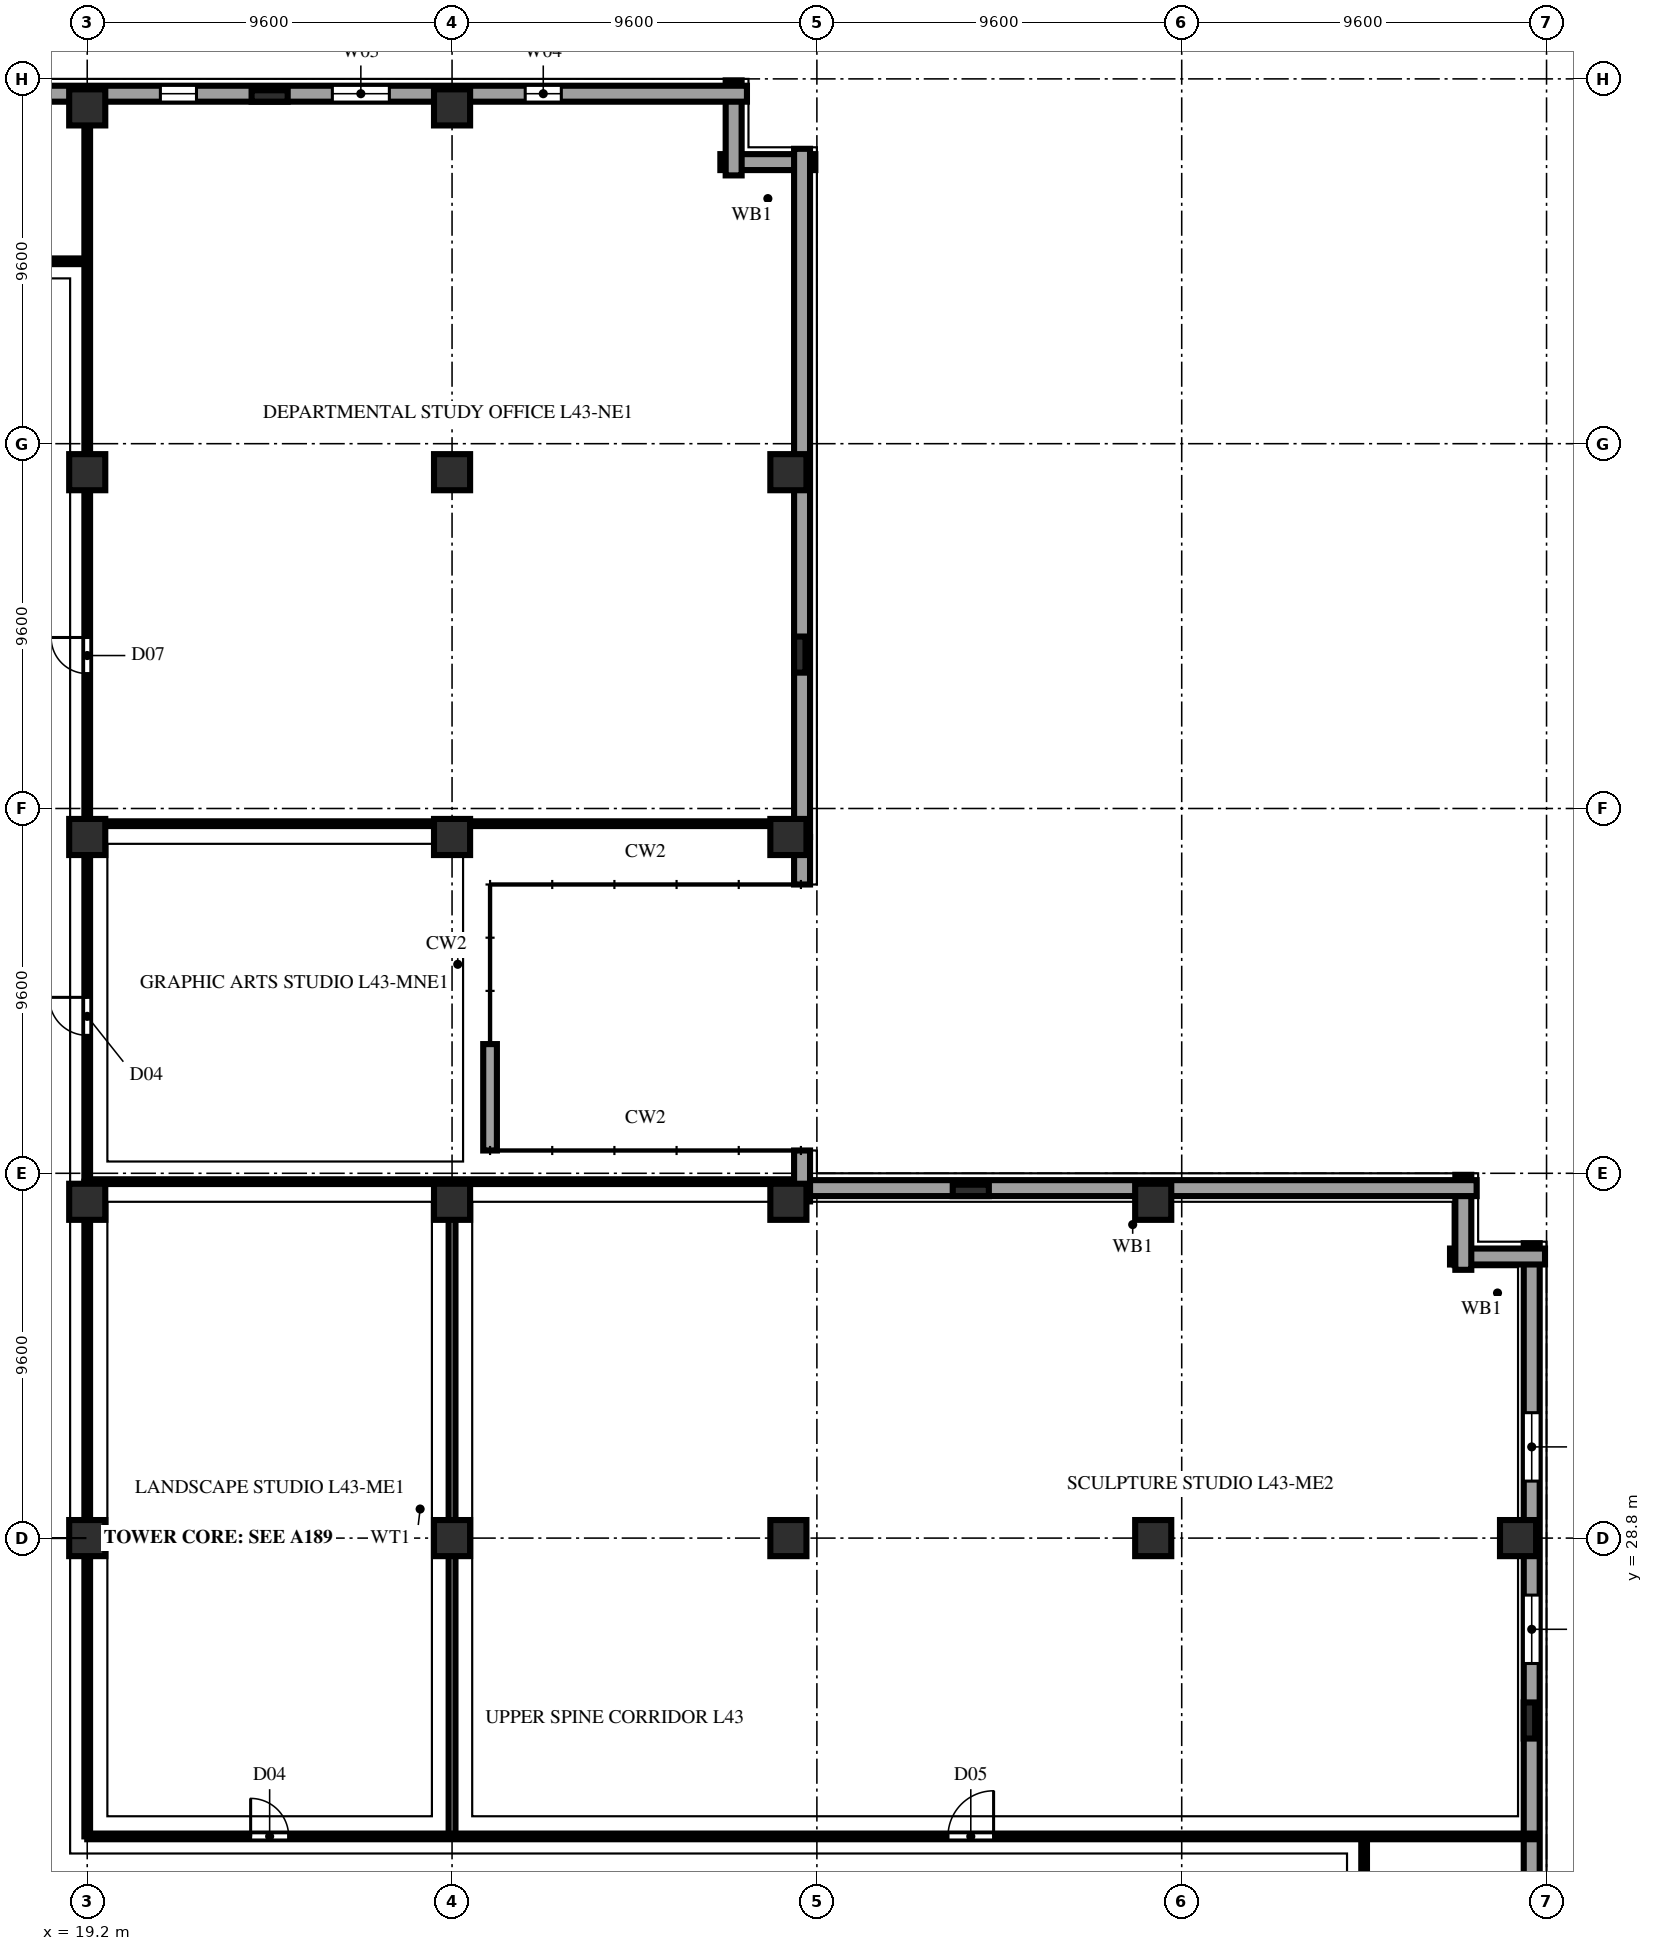
"""IFC4 building model, lengths in metres.
Left out: names, types, materials, properties, quantities, classifications, styles, units other than length and angle.
Written with IfcOpenShell. Run it as: python <this file> out.ifc"""

import sys

from ifc_helpers import new_model, si_unit, direction, frame, frame_2d, origin, origin_2d, place, context, subcontext, project, spatial, rectangle, extrude, element, fill, save


model = new_model("IFC4")
c1 = context("Model", 3, precision=1e-05, world=origin(), true_north=direction((0.0, 1.0)))
c2 = subcontext(c1, "Body", "Model", "MODEL_VIEW")
j1 = project(units=[si_unit("LENGTHUNIT", "METRE"), si_unit("PLANEANGLEUNIT", "RADIAN")], contexts=[c1])
p1 = place(None, origin())
s1 = spatial("IfcSite", under=j1, at=p1, CompositionType="ELEMENT")
p2 = place(p1, origin())
s2 = spatial("IfcBuilding", under=s1, at=p2, CompositionType="ELEMENT")
p3 = place(p2, frame((0.0, 0.0, 171.2)))
s3 = spatial("IfcBuildingStorey", under=s2, at=p3, CompositionType="ELEMENT", Elevation=171.2)
for number, where, z_axis, x_axis in (
    (1, (19.2, 28.8, 0.0), (0.0, 0.0, 1.0), (1.0, 0.0, 0.0)),
    (2, (19.2, 37.65, 0.0), (0.0, 0.0, 1.0), (1.0, 0.0, 0.0)),
    (3, (19.2, 47.25, 0.0), (0.0, 0.0, 1.0), (1.0, 0.0, 0.0)),
    (4, (19.2, 56.85, 0.0), (0.0, 0.0, 1.0), (1.0, 0.0, 0.0)),
    (5, (19.2, 66.45, 0.0), (0.0, 0.0, 1.0), (1.0, 0.0, 0.0)),
    (6, (28.8, 28.8, 0.0), (0.0, 0.0, 1.0), (1.0, 0.0, 0.0)),
    (7, (28.8, 37.65, 0.0), (0.0, 0.0, 1.0), (1.0, 0.0, 0.0)),
    (8, (28.8, 47.25, 0.0), (0.0, 0.0, 1.0), (1.0, 0.0, 0.0)),
    (9, (28.8, 56.85, 0.0), (0.0, 0.0, 1.0), (1.0, 0.0, 0.0)),
    (10, (28.8, 66.45, 0.0), (0.0, 0.0, 1.0), (1.0, 0.0, 0.0)),
    (11, (37.65, 28.8, 0.0), (0.0, 0.0, 1.0), (1.0, 0.0, 0.0)),
    (12, (37.65, 37.65, 0.0), (0.0, 0.0, 1.0), (1.0, 0.0, 0.0)),
    (13, (37.65, 47.25, 0.0), (0.0, 0.0, 1.0), (1.0, 0.0, 0.0)),
    (14, (37.65, 56.85, 0.0), (0.0, 0.0, 1.0), (1.0, 0.0, 0.0)),
    (15, (47.25, 28.8, 0.0), (0.0, 0.0, 1.0), (1.0, 0.0, 0.0)),
    (16, (47.25, 37.65, 0.0), (0.0, 0.0, 1.0), (1.0, 0.0, 0.0)),
    (17, (56.85, 28.8, 0.0), (0.0, 0.0, 1.0), (1.0, 0.0, 0.0)),
):
    element("IfcColumn", number, at=place(p3, frame(where, z_axis=z_axis, x_axis=x_axis)), inside=s3, PredefinedType="COLUMN", context=c2, shape_type="SweptSolid", body=[
        extrude(rectangle(XDim=0.95, YDim=0.95, at=origin_2d()), origin(), (0.0, 0.0, 1.0), 3.8),
    ])
for number, where, z_axis, x_axis in (
    (18, (57.15, 24.0, 0.0), (0.0, 0.0, 1.0), (0.0, 1.0, 0.0)),
    (19, (24.0, 66.75, 0.0), (0.0, 0.0, 1.0), (1.0, 0.0, 0.0)),
    (20, (37.95, 52.05, 0.0), (0.0, 0.0, 1.0), (0.0, 1.0, 0.0)),
    (21, (42.45, 37.95, 0.0), (0.0, 0.0, 1.0), (1.0, 0.0, 0.0)),
):
    element("IfcColumn", number, at=place(p3, frame(where, z_axis=z_axis, x_axis=x_axis)), inside=s3, PredefinedType="PILASTER", context=c2, shape_type="SweptSolid", body=[
        extrude(rectangle(XDim=0.95, YDim=0.3, at=origin_2d()), origin(), (0.0, 0.0, 1.0), 3.8),
    ])
p4 = place(p3, frame((57.21, 1.84, 0.0), z_axis=(0.0, 0.0, 1.0), x_axis=(0.0, 1.0, 0.0)))
e22 = element("IfcWall", 22, at=p4, inside=s3, PredefinedType="SOLIDWALL", context=c2, shape_type="SweptSolid", body=[
    extrude(rectangle(XDim=34.72, YDim=0.42, at=frame_2d((17.36, 0.0))), origin(), (0.0, 0.0, 1.0), 3.54),
])
p5 = place(p4, frame((4.46, 0.0, 0.85)))
e23 = element("IfcOpeningElement", 23, at=p5, cuts=e22, PredefinedType="OPENING", context=c2, shape_type="SweptSolid", body=[
    extrude(rectangle(XDim=1.8, YDim=1.85, at=frame_2d((0.9, 0.925))), frame((0.0, 0.222, 0.0), z_axis=(0.0, -1.0, 0.0), x_axis=(1.0, 0.0, 0.0)), (0.0, 0.0, 1.0), 0.444),
])
p6 = place(p4, frame((9.26, 0.0, 0.85)))
e24 = element("IfcOpeningElement", 24, at=p6, cuts=e22, PredefinedType="OPENING", context=c2, shape_type="SweptSolid", body=[
    extrude(rectangle(XDim=1.8, YDim=1.85, at=frame_2d((0.9, 0.925))), frame((0.0, 0.222, 0.0), z_axis=(0.0, -1.0, 0.0), x_axis=(1.0, 0.0, 0.0)), (0.0, 0.0, 1.0), 0.444),
])
p7 = place(p4, frame((23.66, 0.0, 0.85)))
e25 = element("IfcOpeningElement", 25, at=p7, cuts=e22, PredefinedType="OPENING", context=c2, shape_type="SweptSolid", body=[
    extrude(rectangle(XDim=1.8, YDim=1.85, at=frame_2d((0.9, 0.925))), frame((0.0, 0.222, 0.0), z_axis=(0.0, -1.0, 0.0), x_axis=(1.0, 0.0, 0.0)), (0.0, 0.0, 1.0), 0.444),
])
p8 = place(p4, frame((28.46, 0.0, 0.85)))
e26 = element("IfcOpeningElement", 26, at=p8, cuts=e22, PredefinedType="OPENING", context=c2, shape_type="SweptSolid", body=[
    extrude(rectangle(XDim=1.8, YDim=1.85, at=frame_2d((0.9, 0.925))), frame((0.0, 0.222, 0.0), z_axis=(0.0, -1.0, 0.0), x_axis=(1.0, 0.0, 0.0)), (0.0, 0.0, 1.0), 0.444),
])
for number, where, z_axis, x_axis in (
    (27, (57.56, 36.21, 0.0), (0.0, 0.0, 1.0), (-1.0, 0.0, 0.0)),
    (28, (55.41, 35.86, 0.0), (0.0, 0.0, 1.0), (0.0, 1.0, 0.0)),
):
    element("IfcWall", number, at=place(p3, frame(where, z_axis=z_axis, x_axis=x_axis)), inside=s3, PredefinedType="SOLIDWALL", context=c2, shape_type="SweptSolid", body=[
        extrude(rectangle(XDim=2.5, YDim=0.42, at=frame_2d((1.25, 0.0))), origin(), (0.0, 0.0, 1.0), 3.54),
    ])
p9 = place(p3, frame((55.76, 38.01, 0.0), z_axis=(0.0, 0.0, 1.0), x_axis=(-1.0, 0.0, 0.0)))
e29 = element("IfcWall", 29, at=p9, inside=s3, PredefinedType="SOLIDWALL", context=c2, shape_type="SweptSolid", body=[
    extrude(rectangle(XDim=18.1, YDim=0.42, at=frame_2d((9.05, 0.0))), origin(), (0.0, 0.0, 1.0), 3.54),
])
p10 = place(p3, frame((38.01, 37.66, 0.0), z_axis=(0.0, 0.0, 1.0), x_axis=(0.0, 1.0, 0.0)))
e30 = element("IfcWall", 30, at=p10, inside=s3, PredefinedType="SOLIDWALL", context=c2, shape_type="SweptSolid", body=[
    extrude(rectangle(XDim=1.34, YDim=0.42, at=frame_2d((0.67, 0.0))), origin(), (0.0, 0.0, 1.0), 2.14),
])
p11 = place(p3, frame((38.01, 46.0, 0.0), z_axis=(0.0, 0.0, 1.0), x_axis=(0.0, 1.0, 0.0)))
e31 = element("IfcWall", 31, at=p11, inside=s3, PredefinedType="SOLIDWALL", context=c2, shape_type="SweptSolid", body=[
    extrude(rectangle(XDim=1.25, YDim=0.42, at=frame_2d((0.625, 0.0))), origin(), (0.0, 0.0, 1.0), 2.14),
])
for number, where, z_axis, x_axis in (
    (32, (38.36, 65.01, 0.0), (0.0, 0.0, 1.0), (-1.0, 0.0, 0.0)),
    (33, (36.21, 64.66, 0.0), (0.0, 0.0, 1.0), (0.0, 1.0, 0.0)),
):
    element("IfcWall", number, at=place(p3, frame(where, z_axis=z_axis, x_axis=x_axis)), inside=s3, PredefinedType="SOLIDWALL", context=c2, shape_type="SweptSolid", body=[
        extrude(rectangle(XDim=2.5, YDim=0.42, at=frame_2d((1.25, 0.0))), origin(), (0.0, 0.0, 1.0), 3.54),
    ])
p12 = place(p3, frame((36.56, 66.81, 0.0), z_axis=(0.0, 0.0, 1.0), x_axis=(-1.0, 0.0, 0.0)))
e34 = element("IfcWall", 34, at=p12, inside=s3, PredefinedType="SOLIDWALL", context=c2, shape_type="SweptSolid", body=[
    extrude(rectangle(XDim=34.72, YDim=0.42, at=frame_2d((17.36, 0.0))), origin(), (0.0, 0.0, 1.0), 3.54),
])
p13 = place(p12, frame((4.885, 0.0, 0.9)))
e35 = element("IfcOpeningElement", 35, at=p13, cuts=e34, PredefinedType="OPENING", context=c2, shape_type="SweptSolid", body=[
    extrude(rectangle(XDim=0.95, YDim=1.85, at=frame_2d((0.475, 0.925))), frame((0.0, 0.222, 0.0), z_axis=(0.0, -1.0, 0.0), x_axis=(1.0, 0.0, 0.0)), (0.0, 0.0, 1.0), 0.444),
])
p14 = place(p12, frame((9.41, 0.0, 0.9)))
e36 = element("IfcOpeningElement", 36, at=p14, cuts=e34, PredefinedType="OPENING", context=c2, shape_type="SweptSolid", body=[
    extrude(rectangle(XDim=1.5, YDim=1.85, at=frame_2d((0.75, 0.925))), frame((0.0, 0.222, 0.0), z_axis=(0.0, -1.0, 0.0), x_axis=(1.0, 0.0, 0.0)), (0.0, 0.0, 1.0), 0.444),
])
p15 = place(p12, frame((14.485, 0.0, 0.9)))
e37 = element("IfcOpeningElement", 37, at=p15, cuts=e34, PredefinedType="OPENING", context=c2, shape_type="SweptSolid", body=[
    extrude(rectangle(XDim=0.95, YDim=1.85, at=frame_2d((0.475, 0.925))), frame((0.0, 0.222, 0.0), z_axis=(0.0, -1.0, 0.0), x_axis=(1.0, 0.0, 0.0)), (0.0, 0.0, 1.0), 0.444),
])
p16 = place(p3, frame((29.8, 39.0, 0.0), z_axis=(0.0, 0.0, 1.0), x_axis=(0.0, 1.0, 0.0)))
e38 = element("IfcWall", 38, at=p16, inside=s3, PredefinedType="SOLIDWALL", context=c2, shape_type="SweptSolid", body=[
    extrude(rectangle(XDim=2.8, YDim=0.36, at=frame_2d((1.4, 0.0))), origin(), (0.0, 0.0, 1.0), 3.54),
])
p17 = place(p3, frame((17.05, 62.4, 0.0), z_axis=(0.0, 0.0, 1.0), x_axis=(1.0, 0.0, 0.0)))
e39 = element("IfcWall", 39, at=p17, inside=s3, PredefinedType="PARTITIONING", context=c2, shape_type="SweptSolid", body=[
    extrude(rectangle(XDim=2.15, YDim=0.15, at=frame_2d((1.075, 0.0))), origin(), (0.0, 0.0, 1.0), 3.54),
])
p18 = place(p3, frame((52.8, 18.1, 0.0), z_axis=(0.0, 0.0, 1.0), x_axis=(0.0, 1.0, 0.0)))
e40 = element("IfcWall", 40, at=p18, inside=s3, PredefinedType="PARTITIONING", context=c2, shape_type="SweptSolid", body=[
    extrude(rectangle(XDim=2.85, YDim=0.15, at=frame_2d((1.425, 0.0))), origin(), (0.0, 0.0, 1.0), 3.54),
])
p19 = place(p3, frame((28.8, 20.95, 0.0), z_axis=(0.0, 0.0, 1.0), x_axis=(0.0, 1.0, 0.0)))
e41 = element("IfcWall", 41, at=p19, inside=s3, PredefinedType="PARTITIONING", context=c2, shape_type="SweptSolid", body=[
    extrude(rectangle(XDim=17.23, YDim=0.18, at=frame_2d((8.615, 0.0))), origin(), (0.0, 0.0, 1.0), 2.923),
])
p20 = place(p3, frame((19.2, 20.95, 0.0), z_axis=(0.0, 0.0, 1.0), x_axis=(1.0, 0.0, 0.0)))
e42 = element("IfcWall", 42, at=p20, inside=s3, PredefinedType="PARTITIONING", context=c2, shape_type="SweptSolid", body=[
    extrude(rectangle(XDim=38.18, YDim=0.15, at=frame_2d((19.09, 0.0))), origin(), (0.0, 0.0, 1.0), 3.54),
])
p21 = place(p20, frame((4.3, 0.0, 0.0)))
e43 = element("IfcOpeningElement", 43, at=p21, cuts=e42, PredefinedType="OPENING", context=c2, shape_type="SweptSolid", body=[
    extrude(rectangle(XDim=1.0, YDim=2.2, at=frame_2d((0.5, 1.1))), frame((0.0, 0.087, 0.0), z_axis=(0.0, -1.0, 0.0), x_axis=(1.0, 0.0, 0.0)), (0.0, 0.0, 1.0), 0.174),
])
p22 = place(p20, frame((22.65, 0.0, 0.0)))
e44 = element("IfcOpeningElement", 44, at=p22, cuts=e42, PredefinedType="OPENING", context=c2, shape_type="SweptSolid", body=[
    extrude(rectangle(XDim=1.2, YDim=2.2, at=frame_2d((0.6, 1.1))), frame((0.0, 0.087, 0.0), z_axis=(0.0, -1.0, 0.0), x_axis=(1.0, 0.0, 0.0)), (0.0, 0.0, 1.0), 0.174),
])
p23 = place(p3, frame((19.2, 20.95, 0.0), z_axis=(0.0, 0.0, 1.0), x_axis=(0.0, 1.0, 0.0)))
e45 = element("IfcWall", 45, at=p23, inside=s3, PredefinedType="PARTITIONING", context=c2, shape_type="SweptSolid", body=[
    extrude(rectangle(XDim=17.23, YDim=0.15, at=frame_2d((8.615, 0.0))), origin(), (0.0, 0.0, 1.0), 2.923),
])
p24 = place(p3, frame((19.28, 38.18, 0.0), z_axis=(0.0, 0.0, 1.0), x_axis=(1.0, 0.0, 0.0)))
e46 = element("IfcWall", 46, at=p24, inside=s3, PredefinedType="PARTITIONING", context=c2, shape_type="SweptSolid", body=[
    extrude(rectangle(XDim=18.37, YDim=0.125, at=frame_2d((9.185, 0.0))), origin(), (0.0, 0.0, 1.0), 3.54),
])
p25 = place(p3, frame((19.2, 38.18, 0.0), z_axis=(0.0, 0.0, 1.0), x_axis=(0.0, 1.0, 0.0)))
e47 = element("IfcWall", 47, at=p25, inside=s3, PredefinedType="PARTITIONING", context=c2, shape_type="SweptSolid", body=[
    extrude(rectangle(XDim=9.07, YDim=0.15, at=frame_2d((4.535, 0.0))), origin(), (0.0, 0.0, 1.0), 2.923),
])
p26 = place(p25, frame((3.85, 0.0, 0.0)))
e48 = element("IfcOpeningElement", 48, at=p26, cuts=e47, PredefinedType="OPENING", context=c2, shape_type="SweptSolid", body=[
    extrude(rectangle(XDim=1.0, YDim=2.2, at=frame_2d((0.5, 1.1))), frame((0.0, 0.087, 0.0), z_axis=(0.0, -1.0, 0.0), x_axis=(1.0, 0.0, 0.0)), (0.0, 0.0, 1.0), 0.174),
])
p27 = place(p3, frame((19.2, 47.25, 0.0), z_axis=(0.0, 0.0, 1.0), x_axis=(0.0, 1.0, 0.0)))
e49 = element("IfcWall", 49, at=p27, inside=s3, PredefinedType="PARTITIONING", context=c2, shape_type="SweptSolid", body=[
    extrude(rectangle(XDim=0.35, YDim=0.15, at=frame_2d((0.175, 0.0))), origin(), (0.0, 0.0, 1.0), 3.54),
])
p28 = place(p3, frame((19.2, 47.6, 0.0), z_axis=(0.0, 0.0, 1.0), x_axis=(1.0, 0.0, 0.0)))
e50 = element("IfcWall", 50, at=p28, inside=s3, PredefinedType="PARTITIONING", context=c2, shape_type="SweptSolid", body=[
    extrude(rectangle(XDim=18.98, YDim=0.125, at=frame_2d((9.49, 0.0))), origin(), (0.0, 0.0, 1.0), 3.54),
])
p29 = place(p3, frame((19.2, 47.6, 0.0), z_axis=(0.0, 0.0, 1.0), x_axis=(0.0, 1.0, 0.0)))
e51 = element("IfcWall", 51, at=p29, inside=s3, PredefinedType="PARTITIONING", context=c2, shape_type="SweptSolid", body=[
    extrude(rectangle(XDim=18.85, YDim=0.15, at=frame_2d((9.425, 0.0))), origin(), (0.0, 0.0, 1.0), 2.923),
])
p30 = place(p29, frame((3.95, 0.0, 0.0)))
e52 = element("IfcOpeningElement", 52, at=p30, cuts=e51, PredefinedType="OPENING", context=c2, shape_type="SweptSolid", body=[
    extrude(rectangle(XDim=0.95, YDim=2.15, at=frame_2d((0.475, 1.075))), frame((0.0, 0.087, 0.0), z_axis=(0.0, -1.0, 0.0), x_axis=(1.0, 0.0, 0.0)), (0.0, 0.0, 1.0), 0.174),
])
p31 = place(p3, frame((19.2, 66.45, 0.0), z_axis=(0.0, 0.0, 1.0), x_axis=(0.0, 1.0, 0.0)))
e53 = element("IfcWall", 53, at=p31, inside=s3, PredefinedType="PARTITIONING", context=c2, shape_type="SweptSolid", body=[
    extrude(rectangle(XDim=0.53, YDim=0.15, at=frame_2d((0.265, 0.0))), origin(), (0.0, 0.0, 1.0), 3.54),
])
p32 = place(p3, frame((38.01, 47.25, 0.0), z_axis=(0.0, 0.0, 1.0), x_axis=(0.0, 1.0, 0.0)))
e54 = element("IfcWall", 54, at=p32, inside=s3, PredefinedType="SOLIDWALL", context=c2, shape_type="SweptSolid", body=[
    extrude(rectangle(XDim=18.11, YDim=0.42, at=frame_2d((9.055, 0.0))), origin(), (0.0, 0.0, 1.0), 3.54),
])
p33 = place(p7, origin())
e55 = element("IfcWindow", 55, at=p33, inside=s3, PartitioningType="DOUBLE_PANEL_VERTICAL", PredefinedType="WINDOW", context=c2, shape_type="SweptSolid", body=[
    extrude(rectangle(XDim=1.8, YDim=1.85, at=frame_2d((0.9, 0.925))), frame((0.0, 0.11, 0.0), z_axis=(0.0, -1.0, 0.0), x_axis=(1.0, 0.0, 0.0)), (0.0, 0.0, 1.0), 0.06),
])
fill(e25, e55)
p34 = place(p8, origin())
e56 = element("IfcWindow", 56, at=p34, inside=s3, PartitioningType="DOUBLE_PANEL_VERTICAL", PredefinedType="WINDOW", context=c2, shape_type="SweptSolid", body=[
    extrude(rectangle(XDim=1.8, YDim=1.85, at=frame_2d((0.9, 0.925))), frame((0.0, 0.11, 0.0), z_axis=(0.0, -1.0, 0.0), x_axis=(1.0, 0.0, 0.0)), (0.0, 0.0, 1.0), 0.06),
])
fill(e26, e56)
p35 = place(p13, origin())
e57 = element("IfcWindow", 57, at=p35, inside=s3, PartitioningType="SINGLE_PANEL", PredefinedType="WINDOW", context=c2, shape_type="SweptSolid", body=[
    extrude(rectangle(XDim=0.95, YDim=1.85, at=frame_2d((0.475, 0.925))), frame((0.0, 0.11, 0.0), z_axis=(0.0, -1.0, 0.0), x_axis=(1.0, 0.0, 0.0)), (0.0, 0.0, 1.0), 0.06),
])
fill(e35, e57)
p36 = place(p14, origin())
e58 = element("IfcWindow", 58, at=p36, inside=s3, PartitioningType="DOUBLE_PANEL_VERTICAL", PredefinedType="WINDOW", context=c2, shape_type="SweptSolid", body=[
    extrude(rectangle(XDim=1.5, YDim=1.85, at=frame_2d((0.75, 0.925))), frame((0.0, 0.11, 0.0), z_axis=(0.0, -1.0, 0.0), x_axis=(1.0, 0.0, 0.0)), (0.0, 0.0, 1.0), 0.06),
])
fill(e36, e58)
p37 = place(p15, origin())
e59 = element("IfcWindow", 59, at=p37, inside=s3, PartitioningType="SINGLE_PANEL", PredefinedType="WINDOW", context=c2, shape_type="SweptSolid", body=[
    extrude(rectangle(XDim=0.95, YDim=1.85, at=frame_2d((0.475, 0.925))), frame((0.0, 0.11, 0.0), z_axis=(0.0, -1.0, 0.0), x_axis=(1.0, 0.0, 0.0)), (0.0, 0.0, 1.0), 0.06),
])
fill(e37, e59)
p38 = place(p21, origin())
e60 = element("IfcDoor", 60, at=p38, inside=s3, OperationType="SINGLE_SWING_LEFT", PredefinedType="DOOR", context=c2, shape_type="SweptSolid", body=[
    extrude(rectangle(XDim=1.0, YDim=2.2, at=frame_2d((0.5, 1.1))), frame((0.0, 0.025, 0.0), z_axis=(0.0, -1.0, 0.0), x_axis=(1.0, 0.0, 0.0)), (0.0, 0.0, 1.0), 0.05),
])
fill(e43, e60)
p39 = place(p22, origin())
e61 = element("IfcDoor", 61, at=p39, inside=s3, OperationType="SINGLE_SWING_RIGHT", PredefinedType="DOOR", context=c2, shape_type="SweptSolid", body=[
    extrude(rectangle(XDim=1.2, YDim=2.2, at=frame_2d((0.6, 1.1))), frame((0.0, 0.025, 0.0), z_axis=(0.0, -1.0, 0.0), x_axis=(1.0, 0.0, 0.0)), (0.0, 0.0, 1.0), 0.05),
])
fill(e44, e61)
p40 = place(p26, origin())
e62 = element("IfcDoor", 62, at=p40, inside=s3, OperationType="SINGLE_SWING_RIGHT", PredefinedType="DOOR", context=c2, shape_type="SweptSolid", body=[
    extrude(rectangle(XDim=1.0, YDim=2.2, at=frame_2d((0.5, 1.1))), frame((0.0, 0.025, 0.0), z_axis=(0.0, -1.0, 0.0), x_axis=(1.0, 0.0, 0.0)), (0.0, 0.0, 1.0), 0.05),
])
fill(e48, e62)
p41 = place(p30, origin())
e63 = element("IfcDoor", 63, at=p41, inside=s3, OperationType="SINGLE_SWING_RIGHT", PredefinedType="DOOR", context=c2, shape_type="SweptSolid", body=[
    extrude(rectangle(XDim=0.95, YDim=2.15, at=frame_2d((0.475, 1.075))), frame((0.0, 0.025, 0.0), z_axis=(0.0, -1.0, 0.0), x_axis=(1.0, 0.0, 0.0)), (0.0, 0.0, 1.0), 0.05),
])
fill(e52, e63)
save(model, sys.argv[1])
